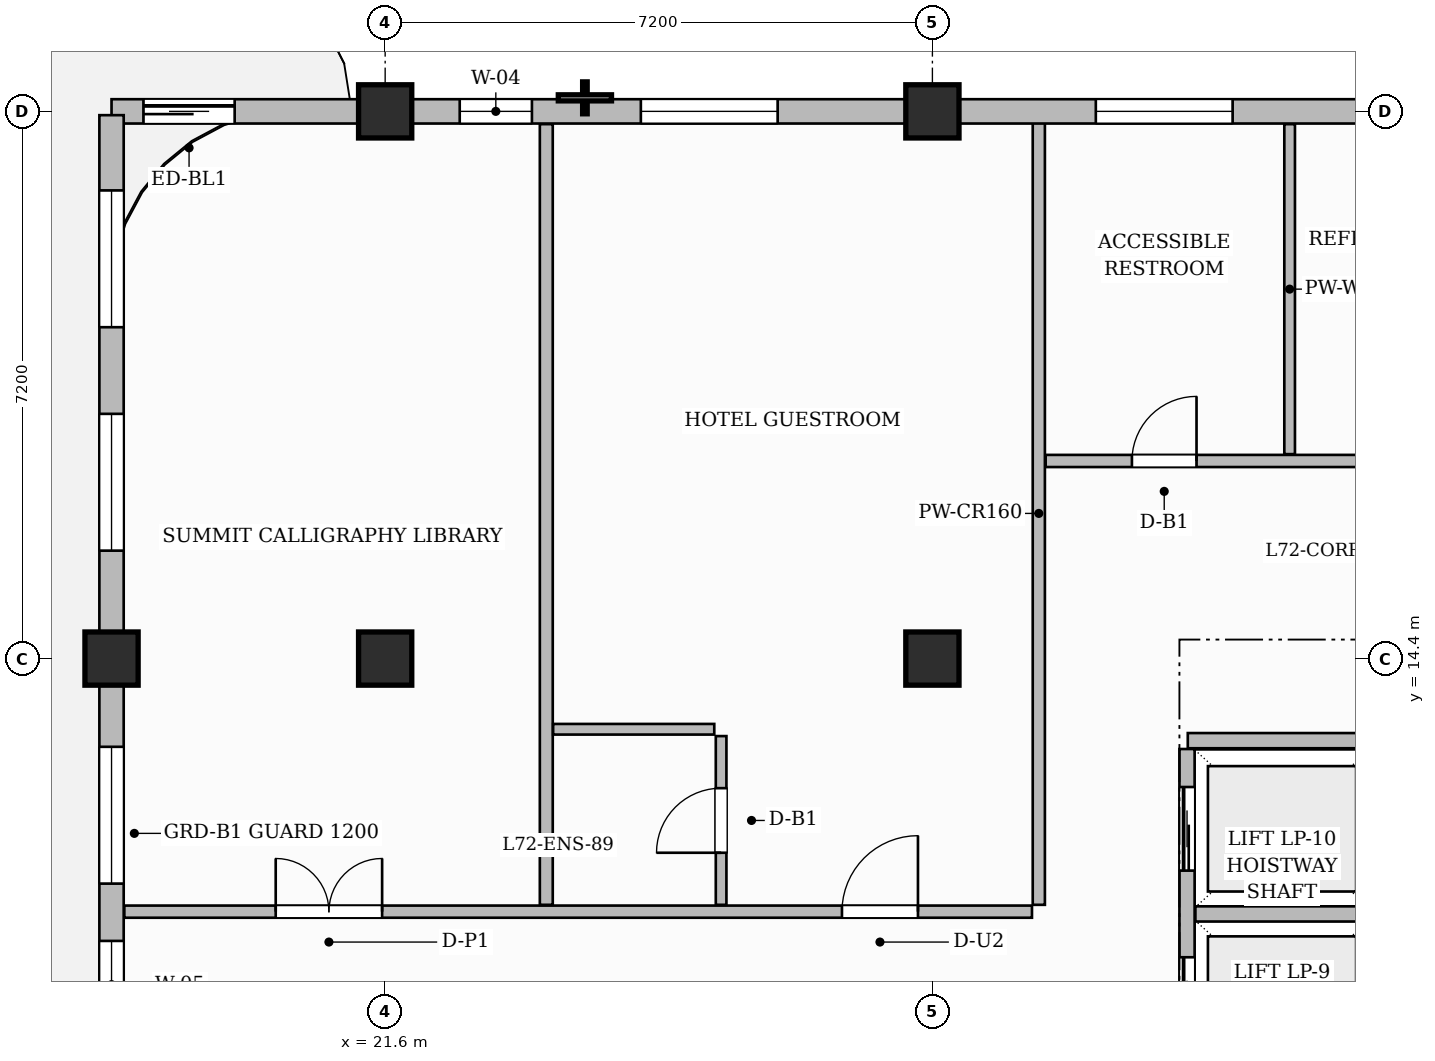
"""IFC4 building model, lengths in metres.
Left out: names, types, materials, properties, quantities, classifications, styles, units other than length and angle.
Written with IfcOpenShell. Run it as: python <this file> out.ifc"""

import sys

from ifc_helpers import new_model, si_unit, direction, frame, frame_2d, origin, origin_2d, place, context, subcontext, project, spatial, rectangle, extrude, source, transform, mapped, element, fill, save


model = new_model("IFC4")
c1 = context("Model", 3, precision=1e-05, world=origin(), true_north=direction((0.0, 1.0)))
c2 = subcontext(c1, "Body", "Model", "MODEL_VIEW")
j1 = project(units=[si_unit("LENGTHUNIT", "METRE"), si_unit("PLANEANGLEUNIT", "RADIAN")], contexts=[c1])
p1 = place(None, origin())
s1 = spatial("IfcSite", under=j1, at=p1, CompositionType="ELEMENT")
p2 = place(p1, origin())
s2 = spatial("IfcBuilding", under=s1, at=p2, CompositionType="ELEMENT")
p3 = place(p2, frame((0.0, 0.0, 286.6)))
s3 = spatial("IfcBuildingStorey", under=s2, at=p3, CompositionType="ELEMENT", Elevation=286.6)
m1 = source(origin(), c2, "Body", "SweptSolid", [
    extrude(rectangle(XDim=0.7, YDim=0.7, at=origin_2d()), origin(), (0.0, 0.0, 1.0), 3.85),
])
for number, where, z_axis, x_axis in (
    (1, (21.6, 14.4, 0.0), (0.0, 0.0, 1.0), (1.0, 0.0, 0.0)),
    (2, (21.6, 21.6, 0.0), (0.0, 0.0, 1.0), (1.0, 0.0, 0.0)),
    (3, (28.8, 14.4, 0.0), (0.0, 0.0, 1.0), (1.0, 0.0, 0.0)),
    (4, (28.8, 21.6, 0.0), (0.0, 0.0, 1.0), (1.0, 0.0, 0.0)),
    (5, (18.0, 14.4, 0.0), (0.0, 0.0, 1.0), (1.0, 0.0, 0.0)),
):
    element("IfcColumn", number, at=place(p3, frame(where, z_axis=z_axis, x_axis=x_axis)), inside=s3, PredefinedType="COLUMN", context=c2, shape_type="MappedRepresentation", body=[
        mapped(m1, transform((0.0, 0.0, 0.0), scale=1.0)),
    ])
p4 = place(p3, frame((32.16, 13.32, 0.0), z_axis=(0.0, 0.0, 1.0), x_axis=(1.0, 0.0, 0.0)))
e6 = element("IfcWall", 6, at=p4, inside=s3, PredefinedType="PARTITIONING", context=c2, shape_type="SweptSolid", body=[
    extrude(rectangle(XDim=2.385, YDim=0.2, at=frame_2d((1.192, 0.0))), origin(), (0.0, 0.0, 1.0), 3.6),
])
p5 = place(p3, frame((32.15, 4.39, 0.0), z_axis=(0.0, 0.0, 1.0), x_axis=(0.0, 1.0, 0.0)))
e7 = element("IfcWall", 7, at=p5, inside=s3, PredefinedType="PARTITIONING", context=c2, shape_type="SweptSolid", body=[
    extrude(rectangle(XDim=8.82, YDim=0.2, at=frame_2d((4.41, 0.0))), origin(), (0.0, 0.0, 1.0), 3.6),
])
p6 = place(p5, frame((0.5, 0.0, 0.0)))
e8 = element("IfcOpeningElement", 8, at=p6, cuts=e7, PredefinedType="OPENING", context=c2, shape_type="SweptSolid", body=[
    extrude(rectangle(XDim=1.1, YDim=2.2, at=frame_2d((0.55, 1.1))), frame((0.0, 0.11, 0.0), z_axis=(0.0, -1.0, 0.0), x_axis=(1.0, 0.0, 0.0)), (0.0, 0.0, 1.0), 0.22),
])
p7 = place(p5, frame((2.74, 0.0, 0.0)))
e9 = element("IfcOpeningElement", 9, at=p7, cuts=e7, PredefinedType="OPENING", context=c2, shape_type="SweptSolid", body=[
    extrude(rectangle(XDim=1.1, YDim=2.2, at=frame_2d((0.55, 1.1))), frame((0.0, 0.11, 0.0), z_axis=(0.0, -1.0, 0.0), x_axis=(1.0, 0.0, 0.0)), (0.0, 0.0, 1.0), 0.22),
])
p8 = place(p5, frame((4.98, 0.0, 0.0)))
e10 = element("IfcOpeningElement", 10, at=p8, cuts=e7, PredefinedType="OPENING", context=c2, shape_type="SweptSolid", body=[
    extrude(rectangle(XDim=1.1, YDim=2.2, at=frame_2d((0.55, 1.1))), frame((0.0, 0.11, 0.0), z_axis=(0.0, -1.0, 0.0), x_axis=(1.0, 0.0, 0.0)), (0.0, 0.0, 1.0), 0.22),
])
p9 = place(p5, frame((7.22, 0.0, 0.0)))
e11 = element("IfcOpeningElement", 11, at=p9, cuts=e7, PredefinedType="OPENING", context=c2, shape_type="SweptSolid", body=[
    extrude(rectangle(XDim=1.1, YDim=2.2, at=frame_2d((0.55, 1.1))), frame((0.0, 0.11, 0.0), z_axis=(0.0, -1.0, 0.0), x_axis=(1.0, 0.0, 0.0)), (0.0, 0.0, 1.0), 0.22),
])
p10 = place(p3, frame((32.26, 11.04, 0.0), z_axis=(0.0, 0.0, 1.0), x_axis=(1.0, 0.0, 0.0)))
e12 = element("IfcWall", 12, at=p10, inside=s3, PredefinedType="PARTITIONING", context=c2, shape_type="SweptSolid", body=[
    extrude(rectangle(XDim=2.255, YDim=0.2, at=frame_2d((1.127, 0.0))), origin(), (0.0, 0.0, 1.0), 3.6),
])
p11 = place(p3, frame((18.168, 11.07, 0.0), z_axis=(0.0, 0.0, 1.0), x_axis=(1.0, 0.0, 0.0)))
e13 = element("IfcWall", 13, at=p11, inside=s3, PredefinedType="PARTITIONING", context=c2, shape_type="SweptSolid", body=[
    extrude(rectangle(XDim=11.942, YDim=0.16, at=frame_2d((5.971, 0.0))), origin(), (0.0, 0.0, 1.0), 3.6),
])
p12 = place(p11, frame((1.992, 0.0, 0.0)))
e14 = element("IfcOpeningElement", 14, at=p12, cuts=e13, PredefinedType="OPENING", context=c2, shape_type="SweptSolid", body=[
    extrude(rectangle(XDim=1.4, YDim=2.35, at=frame_2d((0.7, 1.175))), frame((0.0, 0.09, 0.0), z_axis=(0.0, -1.0, 0.0), x_axis=(1.0, 0.0, 0.0)), (0.0, 0.0, 1.0), 0.18),
])
p13 = place(p11, frame((9.442, 0.0, 0.0)))
e15 = element("IfcOpeningElement", 15, at=p13, cuts=e13, PredefinedType="OPENING", context=c2, shape_type="SweptSolid", body=[
    extrude(rectangle(XDim=1.0, YDim=2.2, at=frame_2d((0.5, 1.1))), frame((0.0, 0.09, 0.0), z_axis=(0.0, -1.0, 0.0), x_axis=(1.0, 0.0, 0.0)), (0.0, 0.0, 1.0), 0.18),
])
p14 = place(p3, frame((30.2, 11.16, 0.0), z_axis=(0.0, 0.0, 1.0), x_axis=(0.0, 1.0, 0.0)))
e16 = element("IfcWall", 16, at=p14, inside=s3, PredefinedType="PARTITIONING", context=c2, shape_type="SweptSolid", body=[
    extrude(rectangle(XDim=10.3, YDim=0.16, at=frame_2d((5.15, 0.0))), origin(), (0.0, 0.0, 1.0), 3.6),
])
p15 = place(p3, frame((30.29, 17.0, 0.0), z_axis=(0.0, 0.0, 1.0), x_axis=(1.0, 0.0, 0.0)))
e17 = element("IfcWall", 17, at=p15, inside=s3, PredefinedType="PARTITIONING", context=c2, shape_type="SweptSolid", body=[
    extrude(rectangle(XDim=19.37, YDim=0.16, at=frame_2d((9.685, 0.0))), origin(), (0.0, 0.0, 1.0), 3.6),
])
p16 = place(p15, frame((1.135, 0.0, 0.0)))
e18 = element("IfcOpeningElement", 18, at=p16, cuts=e17, PredefinedType="OPENING", context=c2, shape_type="SweptSolid", body=[
    extrude(rectangle(XDim=0.85, YDim=2.1, at=frame_2d((0.425, 1.05))), frame((0.0, 0.09, 0.0), z_axis=(0.0, -1.0, 0.0), x_axis=(1.0, 0.0, 0.0)), (0.0, 0.0, 1.0), 0.18),
])
p17 = place(p15, frame((5.71, 0.0, 0.0)))
e19 = element("IfcOpeningElement", 19, at=p17, cuts=e17, PredefinedType="OPENING", context=c2, shape_type="SweptSolid", body=[
    extrude(rectangle(XDim=0.9, YDim=2.15, at=frame_2d((0.45, 1.075))), frame((0.0, 0.09, 0.0), z_axis=(0.0, -1.0, 0.0), x_axis=(1.0, 0.0, 0.0)), (0.0, 0.0, 1.0), 0.18),
])
p18 = place(p15, frame((10.635, 0.0, 0.0)))
e20 = element("IfcOpeningElement", 20, at=p18, cuts=e17, PredefinedType="OPENING", context=c2, shape_type="SweptSolid", body=[
    extrude(rectangle(XDim=0.95, YDim=2.15, at=frame_2d((0.475, 1.075))), frame((0.0, 0.09, 0.0), z_axis=(0.0, -1.0, 0.0), x_axis=(1.0, 0.0, 0.0)), (0.0, 0.0, 1.0), 0.18),
])
p19 = place(p15, frame((16.235, 0.0, 0.0)))
e21 = element("IfcOpeningElement", 21, at=p19, cuts=e17, PredefinedType="OPENING", context=c2, shape_type="SweptSolid", body=[
    extrude(rectangle(XDim=0.95, YDim=2.15, at=frame_2d((0.475, 1.075))), frame((0.0, 0.09, 0.0), z_axis=(0.0, -1.0, 0.0), x_axis=(1.0, 0.0, 0.0)), (0.0, 0.0, 1.0), 0.18),
])
p20 = place(p3, frame((33.5, 17.09, 0.0), z_axis=(0.0, 0.0, 1.0), x_axis=(0.0, 1.0, 0.0)))
e22 = element("IfcWall", 22, at=p20, inside=s3, PredefinedType="PARTITIONING", context=c2, shape_type="SweptSolid", body=[
    extrude(rectangle(XDim=4.342, YDim=0.14, at=frame_2d((2.171, 0.0))), origin(), (0.0, 0.0, 1.0), 3.6),
])
p21 = place(p3, frame((23.72, 11.16, 0.0), z_axis=(0.0, 0.0, 1.0), x_axis=(0.0, 1.0, 0.0)))
e23 = element("IfcWall", 23, at=p21, inside=s3, PredefinedType="PARTITIONING", context=c2, shape_type="SweptSolid", body=[
    extrude(rectangle(XDim=10.272, YDim=0.17, at=frame_2d((5.136, 0.0))), origin(), (0.0, 0.0, 1.0), 3.6),
])
p22 = place(p3, frame((26.02, 11.16, 0.0), z_axis=(0.0, 0.0, 1.0), x_axis=(0.0, 1.0, 0.0)))
e24 = element("IfcWall", 24, at=p22, inside=s3, PredefinedType="PARTITIONING", context=c2, shape_type="SweptSolid", body=[
    extrude(rectangle(XDim=2.22, YDim=0.14, at=frame_2d((1.11, 0.0))), origin(), (0.0, 0.0, 1.0), 3.6),
])
p23 = place(p22, frame((0.685, 0.0, 0.0)))
e25 = element("IfcOpeningElement", 25, at=p23, cuts=e24, PredefinedType="OPENING", context=c2, shape_type="SweptSolid", body=[
    extrude(rectangle(XDim=0.85, YDim=2.1, at=frame_2d((0.425, 1.05))), frame((0.0, 0.08, 0.0), z_axis=(0.0, -1.0, 0.0), x_axis=(1.0, 0.0, 0.0)), (0.0, 0.0, 1.0), 0.16),
])
p24 = place(p3, frame((23.81, 13.47, 0.0), z_axis=(0.0, 0.0, 1.0), x_axis=(1.0, 0.0, 0.0)))
e26 = element("IfcWall", 26, at=p24, inside=s3, PredefinedType="PARTITIONING", context=c2, shape_type="SweptSolid", body=[
    extrude(rectangle(XDim=2.12, YDim=0.14, at=frame_2d((1.06, 0.0))), origin(), (0.0, 0.0, 1.0), 3.6),
])
p25 = place(p3, frame((18.0, 21.6, 0.0), z_axis=(0.0, 0.0, 1.0), x_axis=(1.0, 0.0, 0.0)))
e27 = element("IfcWall", 27, at=p25, inside=s3, PredefinedType="SOLIDWALL", context=c2, shape_type="SweptSolid", body=[
    extrude(rectangle(XDim=31.8, YDim=0.32, at=frame_2d((15.9, 0.0))), origin(), (0.0, 0.0, 1.0), 3.185),
])
p26 = place(p25, frame((0.42, 0.0, 0.0)))
e28 = element("IfcOpeningElement", 28, at=p26, cuts=e27, PredefinedType="OPENING", context=c2, shape_type="SweptSolid", body=[
    extrude(rectangle(XDim=1.2, YDim=2.2, at=frame_2d((0.6, 1.1))), frame((0.0, 0.17, 0.0), z_axis=(0.0, -1.0, 0.0), x_axis=(1.0, 0.0, 0.0)), (0.0, 0.0, 1.0), 0.34),
])
p27 = place(p25, frame((4.581, 0.0, 0.8)))
e29 = element("IfcOpeningElement", 29, at=p27, cuts=e27, PredefinedType="OPENING", context=c2, shape_type="SweptSolid", body=[
    extrude(rectangle(XDim=0.95, YDim=1.75, at=frame_2d((0.475, 0.875))), frame((0.0, 0.17, 0.0), z_axis=(0.0, -1.0, 0.0), x_axis=(1.0, 0.0, 0.0)), (0.0, 0.0, 1.0), 0.34),
])
p28 = place(p25, frame((6.964, 0.0, 0.8)))
e30 = element("IfcOpeningElement", 30, at=p28, cuts=e27, PredefinedType="OPENING", context=c2, shape_type="SweptSolid", body=[
    extrude(rectangle(XDim=1.8, YDim=1.85, at=frame_2d((0.9, 0.925))), frame((0.0, 0.17, 0.0), z_axis=(0.0, -1.0, 0.0), x_axis=(1.0, 0.0, 0.0)), (0.0, 0.0, 1.0), 0.34),
])
p29 = place(p25, frame((12.95, 0.0, 0.8)))
e31 = element("IfcOpeningElement", 31, at=p29, cuts=e27, PredefinedType="OPENING", context=c2, shape_type="SweptSolid", body=[
    extrude(rectangle(XDim=1.8, YDim=1.85, at=frame_2d((0.9, 0.925))), frame((0.0, 0.17, 0.0), z_axis=(0.0, -1.0, 0.0), x_axis=(1.0, 0.0, 0.0)), (0.0, 0.0, 1.0), 0.34),
])
p30 = place(p25, frame((18.596, 0.0, 0.8)))
e32 = element("IfcOpeningElement", 32, at=p30, cuts=e27, PredefinedType="OPENING", context=c2, shape_type="SweptSolid", body=[
    extrude(rectangle(XDim=1.8, YDim=1.85, at=frame_2d((0.9, 0.925))), frame((0.0, 0.17, 0.0), z_axis=(0.0, -1.0, 0.0), x_axis=(1.0, 0.0, 0.0)), (0.0, 0.0, 1.0), 0.34),
])
p31 = place(p25, frame((21.729, 0.0, 0.8)))
e33 = element("IfcOpeningElement", 33, at=p31, cuts=e27, PredefinedType="OPENING", context=c2, shape_type="SweptSolid", body=[
    extrude(rectangle(XDim=1.15, YDim=1.8, at=frame_2d((0.575, 0.9))), frame((0.0, 0.17, 0.0), z_axis=(0.0, -1.0, 0.0), x_axis=(1.0, 0.0, 0.0)), (0.0, 0.0, 1.0), 0.34),
])
p32 = place(p25, frame((25.121, 0.0, 0.8)))
e34 = element("IfcOpeningElement", 34, at=p32, cuts=e27, PredefinedType="OPENING", context=c2, shape_type="SweptSolid", body=[
    extrude(rectangle(XDim=0.95, YDim=1.75, at=frame_2d((0.475, 0.875))), frame((0.0, 0.17, 0.0), z_axis=(0.0, -1.0, 0.0), x_axis=(1.0, 0.0, 0.0)), (0.0, 0.0, 1.0), 0.34),
])
p33 = place(p25, frame((27.804, 0.0, 0.8)))
e35 = element("IfcOpeningElement", 35, at=p33, cuts=e27, PredefinedType="OPENING", context=c2, shape_type="SweptSolid", body=[
    extrude(rectangle(XDim=1.8, YDim=1.85, at=frame_2d((0.9, 0.925))), frame((0.0, 0.17, 0.0), z_axis=(0.0, -1.0, 0.0), x_axis=(1.0, 0.0, 0.0)), (0.0, 0.0, 1.0), 0.34),
])
p34 = place(p3, frame((18.0, 0.05, 0.0), z_axis=(0.0, 0.0, 1.0), x_axis=(0.0, 1.0, 0.0)))
e36 = element("IfcWall", 36, at=p34, inside=s3, PredefinedType="SOLIDWALL", context=c2, shape_type="SweptSolid", body=[
    extrude(rectangle(XDim=21.5, YDim=0.32, at=frame_2d((10.75, 0.0))), origin(), (0.0, 0.0, 1.0), 3.6),
])
p35 = place(p34, frame((0.99, 0.0, 0.8)))
e37 = element("IfcOpeningElement", 37, at=p35, cuts=e36, PredefinedType="OPENING", context=c2, shape_type="SweptSolid", body=[
    extrude(rectangle(XDim=1.8, YDim=1.85, at=frame_2d((0.9, 0.925))), frame((0.0, 0.17, 0.0), z_axis=(0.0, -1.0, 0.0), x_axis=(1.0, 0.0, 0.0)), (0.0, 0.0, 1.0), 0.34),
])
p36 = place(p34, frame((3.93, 0.0, 0.8)))
e38 = element("IfcOpeningElement", 38, at=p36, cuts=e36, PredefinedType="OPENING", context=c2, shape_type="SweptSolid", body=[
    extrude(rectangle(XDim=1.8, YDim=1.85, at=frame_2d((0.9, 0.925))), frame((0.0, 0.17, 0.0), z_axis=(0.0, -1.0, 0.0), x_axis=(1.0, 0.0, 0.0)), (0.0, 0.0, 1.0), 0.34),
])
p37 = place(p34, frame((9.485, 0.0, 0.8)))
e39 = element("IfcOpeningElement", 39, at=p37, cuts=e36, PredefinedType="OPENING", context=c2, shape_type="SweptSolid", body=[
    extrude(rectangle(XDim=1.15, YDim=1.8, at=frame_2d((0.575, 0.9))), frame((0.0, 0.17, 0.0), z_axis=(0.0, -1.0, 0.0), x_axis=(1.0, 0.0, 0.0)), (0.0, 0.0, 1.0), 0.34),
])
p38 = place(p34, frame((11.389, 0.0, 0.8)))
e40 = element("IfcOpeningElement", 40, at=p38, cuts=e36, PredefinedType="OPENING", context=c2, shape_type="SweptSolid", body=[
    extrude(rectangle(XDim=1.8, YDim=1.85, at=frame_2d((0.9, 0.925))), frame((0.0, 0.17, 0.0), z_axis=(0.0, -1.0, 0.0), x_axis=(1.0, 0.0, 0.0)), (0.0, 0.0, 1.0), 0.34),
])
p39 = place(p34, frame((15.77, 0.0, 0.8)))
e41 = element("IfcOpeningElement", 41, at=p39, cuts=e36, PredefinedType="OPENING", context=c2, shape_type="SweptSolid", body=[
    extrude(rectangle(XDim=1.8, YDim=1.85, at=frame_2d((0.9, 0.925))), frame((0.0, 0.17, 0.0), z_axis=(0.0, -1.0, 0.0), x_axis=(1.0, 0.0, 0.0)), (0.0, 0.0, 1.0), 0.34),
])
p40 = place(p34, frame((18.71, 0.0, 0.8)))
e42 = element("IfcOpeningElement", 42, at=p40, cuts=e36, PredefinedType="OPENING", context=c2, shape_type="SweptSolid", body=[
    extrude(rectangle(XDim=1.8, YDim=1.85, at=frame_2d((0.9, 0.925))), frame((0.0, 0.17, 0.0), z_axis=(0.0, -1.0, 0.0), x_axis=(1.0, 0.0, 0.0)), (0.0, 0.0, 1.0), 0.34),
])
m2 = source(origin(), c2, "Body", "SweptSolid", [
    extrude(rectangle(XDim=0.85, YDim=2.1, at=frame_2d((0.425, 1.05))), frame((0.0, 0.025, 0.0), z_axis=(0.0, -1.0, 0.0), x_axis=(1.0, 0.0, 0.0)), (0.0, 0.0, 1.0), 0.05),
])
p41 = place(p16, origin())
e43 = element("IfcDoor", 43, at=p41, inside=s3, OperationType="SINGLE_SWING_RIGHT", PredefinedType="DOOR", context=c2, shape_type="MappedRepresentation", body=[
    mapped(m2, transform((0.0, 0.0, 0.0), scale=1.0)),
])
fill(e18, e43)
m3 = source(origin(), c2, "Body", "SweptSolid", [
    extrude(rectangle(XDim=1.4, YDim=2.35, at=frame_2d((0.7, 1.175))), frame((0.0, 0.025, 0.0), z_axis=(0.0, -1.0, 0.0), x_axis=(1.0, 0.0, 0.0)), (0.0, 0.0, 1.0), 0.05),
])
p42 = place(p12, origin())
e44 = element("IfcDoor", 44, at=p42, inside=s3, OperationType="DOUBLE_DOOR_SINGLE_SWING", PredefinedType="DOOR", context=c2, shape_type="MappedRepresentation", body=[
    mapped(m3, transform((0.0, 0.0, 0.0), scale=1.0)),
])
fill(e14, e44)
p43 = place(p23, origin())
e45 = element("IfcDoor", 45, at=p43, inside=s3, OperationType="SINGLE_SWING_LEFT", PredefinedType="DOOR", context=c2, shape_type="MappedRepresentation", body=[
    mapped(m2, transform((0.0, 0.0, 0.0), scale=1.0)),
])
fill(e25, e45)
m4 = source(origin(), c2, "Body", "SweptSolid", [
    extrude(rectangle(XDim=1.0, YDim=2.2, at=frame_2d((0.5, 1.1))), frame((0.0, 0.025, 0.0), z_axis=(0.0, -1.0, 0.0), x_axis=(1.0, 0.0, 0.0)), (0.0, 0.0, 1.0), 0.05),
])
p44 = place(p13, origin())
e46 = element("IfcDoor", 46, at=p44, inside=s3, OperationType="SINGLE_SWING_RIGHT", PredefinedType="DOOR", context=c2, shape_type="MappedRepresentation", body=[
    mapped(m4, transform((0.0, 0.0, 0.0), scale=1.0)),
])
fill(e15, e46)
m5 = source(origin(), c2, "Body", "SweptSolid", [
    extrude(rectangle(XDim=1.1, YDim=2.2, at=frame_2d((0.55, 1.1))), frame((0.0, 0.025, 0.0), z_axis=(0.0, -1.0, 0.0), x_axis=(1.0, 0.0, 0.0)), (0.0, 0.0, 1.0), 0.05),
])
p45 = place(p8, origin())
e47 = element("IfcDoor", 47, at=p45, inside=s3, OperationType="SLIDING_TO_LEFT", PredefinedType="DOOR", context=c2, shape_type="MappedRepresentation", body=[
    mapped(m5, transform((0.0, 0.0, 0.0), scale=1.0)),
])
fill(e10, e47)
p46 = place(p9, origin())
e48 = element("IfcDoor", 48, at=p46, inside=s3, OperationType="SLIDING_TO_LEFT", PredefinedType="DOOR", context=c2, shape_type="MappedRepresentation", body=[
    mapped(m5, transform((0.0, 0.0, 0.0), scale=1.0)),
])
fill(e11, e48)
m6 = source(origin(), c2, "Body", "SweptSolid", [
    extrude(rectangle(XDim=1.2, YDim=2.2, at=frame_2d((0.6, 1.1))), frame((0.0, 0.025, 0.0), z_axis=(0.0, -1.0, 0.0), x_axis=(1.0, 0.0, 0.0)), (0.0, 0.0, 1.0), 0.05),
])
p47 = place(p26, origin())
e49 = element("IfcDoor", 49, at=p47, inside=s3, OperationType="SLIDING_TO_LEFT", PredefinedType="DOOR", context=c2, shape_type="MappedRepresentation", body=[
    mapped(m6, transform((0.0, 0.0, 0.0), scale=1.0)),
])
fill(e28, e49)
m7 = source(origin(), c2, "Body", "SweptSolid", [
    extrude(rectangle(XDim=0.95, YDim=1.75, at=frame_2d((0.475, 0.875))), frame((0.0, 0.03, 0.0), z_axis=(0.0, -1.0, 0.0), x_axis=(1.0, 0.0, 0.0)), (0.0, 0.0, 1.0), 0.06),
])
p48 = place(p27, origin())
e50 = element("IfcWindow", 50, at=p48, inside=s3, PartitioningType="SINGLE_PANEL", PredefinedType="WINDOW", context=c2, shape_type="MappedRepresentation", body=[
    mapped(m7, transform((0.0, 0.0, 0.0), scale=1.0)),
])
fill(e29, e50)
m8 = source(origin(), c2, "Body", "SweptSolid", [
    extrude(rectangle(XDim=1.8, YDim=1.85, at=frame_2d((0.9, 0.925))), frame((0.0, 0.03, 0.0), z_axis=(0.0, -1.0, 0.0), x_axis=(1.0, 0.0, 0.0)), (0.0, 0.0, 1.0), 0.06),
])
p49 = place(p28, origin())
e51 = element("IfcWindow", 51, at=p49, inside=s3, PartitioningType="DOUBLE_PANEL_VERTICAL", PredefinedType="WINDOW", context=c2, shape_type="MappedRepresentation", body=[
    mapped(m8, transform((0.0, 0.0, 0.0), scale=1.0)),
])
fill(e30, e51)
p50 = place(p29, origin())
e52 = element("IfcWindow", 52, at=p50, inside=s3, PartitioningType="DOUBLE_PANEL_VERTICAL", PredefinedType="WINDOW", context=c2, shape_type="MappedRepresentation", body=[
    mapped(m8, transform((0.0, 0.0, 0.0), scale=1.0)),
])
fill(e31, e52)
m9 = source(origin(), c2, "Body", "SweptSolid", [
    extrude(rectangle(XDim=1.15, YDim=1.8, at=frame_2d((0.575, 0.9))), frame((0.0, 0.03, 0.0), z_axis=(0.0, -1.0, 0.0), x_axis=(1.0, 0.0, 0.0)), (0.0, 0.0, 1.0), 0.06),
])
p51 = place(p37, origin())
e53 = element("IfcWindow", 53, at=p51, inside=s3, PartitioningType="SINGLE_PANEL", PredefinedType="WINDOW", context=c2, shape_type="MappedRepresentation", body=[
    mapped(m9, transform((0.0, 0.0, 0.0), scale=1.0)),
])
fill(e39, e53)
p52 = place(p38, origin())
e54 = element("IfcWindow", 54, at=p52, inside=s3, PartitioningType="DOUBLE_PANEL_VERTICAL", PredefinedType="WINDOW", context=c2, shape_type="MappedRepresentation", body=[
    mapped(m8, transform((0.0, 0.0, 0.0), scale=1.0)),
])
fill(e40, e54)
p53 = place(p39, origin())
e55 = element("IfcWindow", 55, at=p53, inside=s3, PartitioningType="DOUBLE_PANEL_VERTICAL", PredefinedType="WINDOW", context=c2, shape_type="MappedRepresentation", body=[
    mapped(m8, transform((0.0, 0.0, 0.0), scale=1.0)),
])
fill(e41, e55)
p54 = place(p40, origin())
e56 = element("IfcWindow", 56, at=p54, inside=s3, PartitioningType="DOUBLE_PANEL_VERTICAL", PredefinedType="WINDOW", context=c2, shape_type="MappedRepresentation", body=[
    mapped(m8, transform((0.0, 0.0, 0.0), scale=1.0)),
])
fill(e42, e56)
save(model, sys.argv[1])
